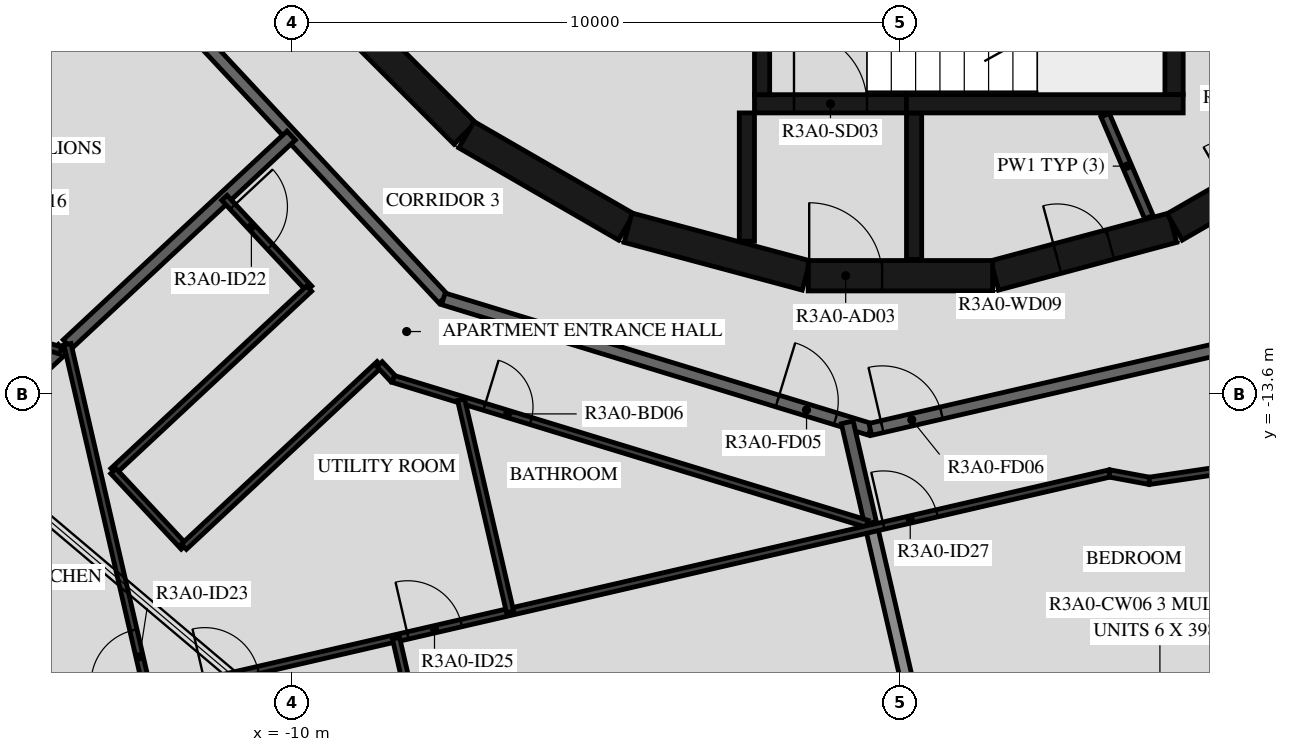
"""IFC4 building model, lengths in metres.
Left out: names, types, materials, properties, quantities, classifications, styles, units other than length and angle.
Written with IfcOpenShell. Run it as: python <this file> out.ifc"""

import sys

from ifc_helpers import new_model, si_unit, direction, frame, frame_2d, origin, place, context, subcontext, project, spatial, rectangle, extrude, element, fill, save


model = new_model("IFC4")
c1 = context("Model", 3, precision=1e-05, world=origin(), true_north=direction((0.0, 1.0)))
c2 = subcontext(c1, "Body", "Model", "MODEL_VIEW")
j1 = project(units=[si_unit("LENGTHUNIT", "METRE"), si_unit("PLANEANGLEUNIT", "RADIAN")], contexts=[c1])
p1 = place(None, origin())
s1 = spatial("IfcSite", under=j1, at=p1, CompositionType="ELEMENT")
p2 = place(p1, origin())
s2 = spatial("IfcBuilding", under=s1, at=p2, CompositionType="ELEMENT")
p3 = place(p2, frame((0.0, 0.0, 113.4)))
s3 = spatial("IfcBuildingStorey", under=s2, at=p3, CompositionType="ELEMENT", Elevation=113.4)
p4 = place(p3, frame((-26.845, -9.558, 0.03), z_axis=(0.0, 0.0, 1.0), x_axis=(0.398491196924, 0.917172157217, 0.0)))
e1 = element("IfcWall", 1, at=p4, inside=s3, PredefinedType="PARAPET", context=c2, shape_type="SweptSolid", body=[
    extrude(rectangle(XDim=35.306, YDim=0.2, at=frame_2d((17.653, 0.0))), origin(), (0.0, 0.0, 1.0), 1.5),
])
p5 = place(p3, frame((1.55, -11.643, 0.0), z_axis=(0.0, 0.0, 1.0), x_axis=(0.965948410781, 0.258734743916, 0.0)))
e2 = element("IfcWall", 2, at=p5, inside=s3, PredefinedType="SHEAR", context=c2, shape_type="SweptSolid", body=[
    extrude(rectangle(XDim=3.033, YDim=0.5, at=frame_2d((1.516, 0.0))), origin(), (0.0, 0.0, 1.0), 3.12),
])
p6 = place(p5, frame((1.066, 0.0, 0.0)))
e3 = element("IfcOpeningElement", 3, at=p6, cuts=e2, PredefinedType="OPENING", context=c2, shape_type="SweptSolid", body=[
    extrude(rectangle(XDim=0.9, YDim=2.1, at=frame_2d((0.45, 1.05))), frame((0.0, 0.26, 0.0), z_axis=(0.0, -1.0, 0.0), x_axis=(1.0, 0.0, 0.0)), (0.0, 0.0, 1.0), 0.52),
])
p7 = place(p3, frame((4.51, -10.845, 0.0), z_axis=(0.0, 0.0, 1.0), x_axis=(0.865975092491, 0.500087131594, 0.0)))
e4 = element("IfcWall", 4, at=p7, inside=s3, PredefinedType="SHEAR", context=c2, shape_type="SweptSolid", body=[
    extrude(rectangle(XDim=3.033, YDim=0.5, at=frame_2d((1.516, 0.0))), origin(), (0.0, 0.0, 1.0), 3.12),
])
p8 = place(p7, frame((1.066, 0.0, 0.0)))
e5 = element("IfcOpeningElement", 5, at=p8, cuts=e4, PredefinedType="OPENING", context=c2, shape_type="SweptSolid", body=[
    extrude(rectangle(XDim=0.9, YDim=2.1, at=frame_2d((0.45, 1.05))), frame((0.0, 0.26, 0.0), z_axis=(0.0, -1.0, 0.0), x_axis=(1.0, 0.0, 0.0)), (0.0, 0.0, 1.0), 0.52),
])
p9 = place(p3, frame((-9.308, -7.164, 0.0), z_axis=(0.0, 0.0, 1.0), x_axis=(0.707106781187, -0.707106781187, 0.0)))
e6 = element("IfcWall", 6, at=p9, inside=s3, PredefinedType="SHEAR", context=c2, shape_type="SweptSolid", body=[
    extrude(rectangle(XDim=3.032, YDim=0.5, at=frame_2d((1.516, 0.0))), origin(), (0.0, 0.0, 1.0), 3.12),
])
for number, where, z_axis, x_axis in (
    (7, (-7.137, -9.329, 0.0), (0.0, 0.0, 1.0), (0.866, -0.5, 0.0)),
    (8, (-4.479, -10.858, 0.0), (0.0, 0.0, 1.0), (0.966, -0.259, 0.0)),
):
    element("IfcWall", number, at=place(p3, frame(where, z_axis=z_axis, x_axis=x_axis)), inside=s3, PredefinedType="SHEAR", context=c2, shape_type="SweptSolid", body=[
        extrude(rectangle(XDim=3.033, YDim=0.5, at=frame_2d((1.516, 0.0))), origin(), (0.0, 0.0, 1.0), 3.12),
    ])
p10 = place(p3, frame((-1.516, -11.647, 0.0), z_axis=(0.0, 0.0, 1.0), x_axis=(1.0, 0.0, 0.0)))
e9 = element("IfcWall", 9, at=p10, inside=s3, PredefinedType="SHEAR", context=c2, shape_type="SweptSolid", body=[
    extrude(rectangle(XDim=3.033, YDim=0.5, at=frame_2d((1.516, 0.0))), origin(), (0.0, 0.0, 1.0), 3.12),
])
p11 = place(p10, frame((0.016, 0.0, 0.0)))
e10 = element("IfcOpeningElement", 10, at=p11, cuts=e9, PredefinedType="OPENING", context=c2, shape_type="SweptSolid", body=[
    extrude(rectangle(XDim=1.2, YDim=2.1, at=frame_2d((0.6, 1.05))), frame((0.0, 0.26, 0.0), z_axis=(0.0, -1.0, 0.0), x_axis=(1.0, 0.0, 0.0)), (0.0, 0.0, 1.0), 0.52),
])
p12 = place(p3, frame((-2.275, -8.67, 0.0), z_axis=(0.0, 0.0, 1.0), x_axis=(0.0, 1.0, 0.0)))
e11 = element("IfcWall", 11, at=p12, inside=s3, PredefinedType="SHEAR", context=c2, shape_type="SweptSolid", body=[
    extrude(rectangle(XDim=3.32, YDim=0.25, at=frame_2d((1.66, 0.0))), origin(), (0.0, 0.0, 1.0), 3.12),
])
p13 = place(p3, frame((4.5, -8.67, 0.0), z_axis=(0.0, 0.0, 1.0), x_axis=(0.0, 1.0, 0.0)))
e12 = element("IfcWall", 12, at=p13, inside=s3, PredefinedType="SHEAR", context=c2, shape_type="SweptSolid", body=[
    extrude(rectangle(XDim=3.32, YDim=0.3, at=frame_2d((1.66, 0.0))), origin(), (0.0, 0.0, 1.0), 3.12),
])
p14 = place(p3, frame((0.1, -8.82, 0.0), z_axis=(0.0, 0.0, 1.0), x_axis=(1.0, 0.0, 0.0)))
e13 = element("IfcWall", 13, at=p14, inside=s3, PredefinedType="SHEAR", context=c2, shape_type="SweptSolid", body=[
    extrude(rectangle(XDim=4.55, YDim=0.3, at=frame_2d((2.275, 0.0))), origin(), (0.0, 0.0, 1.0), 3.12),
])
p15 = place(p3, frame((-2.4, -8.82, 0.0), z_axis=(0.0, 0.0, 1.0), x_axis=(1.0, 0.0, 0.0)))
e14 = element("IfcWall", 14, at=p15, inside=s3, PredefinedType="SHEAR", context=c2, shape_type="SweptSolid", body=[
    extrude(rectangle(XDim=2.5, YDim=0.3, at=frame_2d((1.25, 0.0))), origin(), (0.0, 0.0, 1.0), 3.12),
])
p16 = place(p15, frame((0.65, 0.0, 0.0)))
e15 = element("IfcOpeningElement", 15, at=p16, cuts=e14, PredefinedType="OPENING", context=c2, shape_type="SweptSolid", body=[
    extrude(rectangle(XDim=1.2, YDim=2.1, at=frame_2d((0.6, 1.05))), frame((0.0, 0.16, 0.0), z_axis=(0.0, -1.0, 0.0), x_axis=(1.0, 0.0, 0.0)), (0.0, 0.0, 1.0), 0.32),
])
p17 = place(p3, frame((-2.525, -8.97, 0.0), z_axis=(0.0, 0.0, 1.0), x_axis=(0.0, -1.0, 0.0)))
e16 = element("IfcWall", 16, at=p17, inside=s3, PredefinedType="SHEAR", context=c2, shape_type="SweptSolid", body=[
    extrude(rectangle(XDim=2.11, YDim=0.25, at=frame_2d((1.055, 0.0))), origin(), (0.0, 0.0, 1.0), 3.12),
])
p18 = place(p3, frame((0.225, -8.97, 0.0), z_axis=(0.0, 0.0, 1.0), x_axis=(0.0, -1.0, 0.0)))
e17 = element("IfcWall", 17, at=p18, inside=s3, PredefinedType="SHEAR", context=c2, shape_type="SweptSolid", body=[
    extrude(rectangle(XDim=2.41, YDim=0.25, at=frame_2d((1.205, 0.0))), origin(), (0.0, 0.0, 1.0), 3.12),
])
p19 = place(p3, frame((7.842, -8.248, 0.0), z_axis=(0.0, 0.0, 1.0), x_axis=(-0.66446128181, 0.747322691329, 0.0)))
e18 = element("IfcWall", 18, at=p19, inside=s3, PredefinedType="PARTITIONING", context=c2, shape_type="SweptSolid", body=[
    extrude(rectangle(XDim=4.198, YDim=0.15, at=frame_2d((2.099, 0.0))), origin(), (0.0, 0.0, 1.0), 3.12),
])
p20 = place(p3, frame((3.367, -9.007, 0.0), z_axis=(0.0, 0.0, 1.0), x_axis=(0.394387482265, -0.918944238696, 0.0)))
e19 = element("IfcWall", 19, at=p20, inside=s3, PredefinedType="PARTITIONING", context=c2, shape_type="SweptSolid", body=[
    extrude(rectangle(XDim=1.825, YDim=0.15, at=frame_2d((0.913, 0.0))), origin(), (0.0, 0.0, 1.0), 3.12),
])
p21 = place(p3, frame((-12.523, -6.659, 0.0), z_axis=(0.0, 0.0, 1.0), x_axis=(0.682001841105, -0.731350455479, 0.0)))
e20 = element("IfcWall", 20, at=p21, inside=s3, PredefinedType="STANDARD", context=c2, shape_type="SweptSolid", body=[
    extrude(rectangle(XDim=7.342, YDim=0.2, at=frame_2d((3.671, 0.0))), origin(), (0.0, 0.0, 1.0), 3.12),
])
p22 = place(p3, frame((-7.516, -12.028, 0.0), z_axis=(0.0, 0.0, 1.0), x_axis=(0.956306642771, -0.292365533182, 0.0)))
e21 = element("IfcWall", 21, at=p22, inside=s3, PredefinedType="STANDARD", context=c2, shape_type="SweptSolid", body=[
    extrude(rectangle(XDim=7.342, YDim=0.2, at=frame_2d((3.671, 0.0))), origin(), (0.0, 0.0, 1.0), 3.12),
])
p23 = place(p22, frame((5.745, 0.0, 0.0)))
e22 = element("IfcOpeningElement", 22, at=p23, cuts=e21, PredefinedType="OPENING", context=c2, shape_type="SweptSolid", body=[
    extrude(rectangle(XDim=1.0, YDim=2.1, at=frame_2d((0.5, 1.05))), frame((0.0, 0.11, 0.0), z_axis=(0.0, -1.0, 0.0), x_axis=(1.0, 0.0, 0.0)), (0.0, 0.0, 1.0), 0.22),
])
p24 = place(p3, frame((-0.495, -14.175, 0.0), z_axis=(0.0, 0.0, 1.0), x_axis=(0.974376622151, 0.224922649383, 0.0)))
e23 = element("IfcWall", 23, at=p24, inside=s3, PredefinedType="STANDARD", context=c2, shape_type="SweptSolid", body=[
    extrude(rectangle(XDim=7.342, YDim=0.2, at=frame_2d((3.671, 0.0))), origin(), (0.0, 0.0, 1.0), 3.12),
])
p25 = place(p24, frame((0.2, 0.0, 0.0)))
e24 = element("IfcOpeningElement", 24, at=p25, cuts=e23, PredefinedType="OPENING", context=c2, shape_type="SweptSolid", body=[
    extrude(rectangle(XDim=1.0, YDim=2.1, at=frame_2d((0.5, 1.05))), frame((0.0, 0.11, 0.0), z_axis=(0.0, -1.0, 0.0), x_axis=(1.0, 0.0, 0.0)), (0.0, 0.0, 1.0), 0.22),
])
p26 = place(p3, frame((-13.699, -12.774, 0.0), z_axis=(0.0, 0.0, 1.0), x_axis=(0.731353758457, 0.681998299111, 0.0)))
e25 = element("IfcWall", 25, at=p26, inside=s3, PredefinedType="STANDARD", context=c2, shape_type="SweptSolid", body=[
    extrude(rectangle(XDim=5.031, YDim=0.2, at=frame_2d((2.515, 0.0))), origin(), (0.0, 0.0, 1.0), 3.12),
])
p27 = place(p3, frame((-14.48, -13.503, 0.0), z_axis=(0.0, 0.0, 1.0), x_axis=(0.73152991834, 0.681809341806, 0.0)))
e26 = element("IfcWall", 26, at=p27, inside=s3, PredefinedType="STANDARD", context=c2, shape_type="SweptSolid", body=[
    extrude(rectangle(XDim=0.958, YDim=0.2, at=frame_2d((0.479, 0.0))), origin(), (0.0, 0.0, 1.0), 3.12),
])
p28 = place(p3, frame((-0.492, -15.713, 0.0), z_axis=(0.0, 0.0, 1.0), x_axis=(-0.224974992875, 0.97436453783, 0.0)))
e27 = element("IfcWall", 27, at=p28, inside=s3, PredefinedType="STANDARD", context=c2, shape_type="SweptSolid", body=[
    extrude(rectangle(XDim=1.698, YDim=0.2, at=frame_2d((0.849, 0.0))), origin(), (0.0, 0.0, 1.0), 3.12),
])
p29 = place(p3, frame((0.338, -19.31, 0.0), z_axis=(0.0, 0.0, 1.0), x_axis=(-0.224943703639, 0.9743717618, 0.0)))
e28 = element("IfcWall", 28, at=p29, inside=s3, PredefinedType="STANDARD", context=c2, shape_type="SweptSolid", body=[
    extrude(rectangle(XDim=3.6, YDim=0.2, at=frame_2d((1.8, 0.0))), origin(), (0.0, 0.0, 1.0), 2.73),
])
p30 = place(p3, frame((-19.404, -11.167, 0.0), z_axis=(0.0, 0.0, 1.0), x_axis=(0.956314306829, -0.292340463423, 0.0)))
e29 = element("IfcWall", 29, at=p30, inside=s3, PredefinedType="PARTITIONING", context=c2, shape_type="SweptSolid", body=[
    extrude(rectangle(XDim=5.85, YDim=0.12, at=frame_2d((2.925, 0.0))), origin(), (0.0, 0.0, 1.0), 3.12),
])
p31 = place(p30, frame((0.3, 0.0, 0.0)))
e30 = element("IfcOpeningElement", 30, at=p31, cuts=e29, PredefinedType="OPENING", context=c2, shape_type="SweptSolid", body=[
    extrude(rectangle(XDim=0.9, YDim=2.1, at=frame_2d((0.45, 1.05))), frame((0.0, 0.07, 0.0), z_axis=(0.0, -1.0, 0.0), x_axis=(1.0, 0.0, 0.0)), (0.0, 0.0, 1.0), 0.14),
])
p32 = place(p3, frame((-11.117, -10.366, 0.0), z_axis=(0.0, 0.0, 1.0), x_axis=(0.682041233274, -0.731313719353, 0.0)))
e31 = element("IfcWall", 31, at=p32, inside=s3, PredefinedType="PARTITIONING", context=c2, shape_type="SweptSolid", body=[
    extrude(rectangle(XDim=2.042, YDim=0.12, at=frame_2d((1.021, 0.0))), origin(), (0.0, 0.0, 1.0), 3.12),
])
p33 = place(p32, frame((0.2, 0.0, 0.0)))
e32 = element("IfcOpeningElement", 32, at=p33, cuts=e31, PredefinedType="OPENING", context=c2, shape_type="SweptSolid", body=[
    extrude(rectangle(XDim=0.9, YDim=2.1, at=frame_2d((0.45, 1.05))), frame((0.0, 0.07, 0.0), z_axis=(0.0, -1.0, 0.0), x_axis=(1.0, 0.0, 0.0)), (0.0, 0.0, 1.0), 0.14),
])
p34 = place(p3, frame((-9.724, -11.859, 0.0), z_axis=(0.0, 0.0, 1.0), x_axis=(-0.731365154613, -0.681986078023, 0.0)))
e33 = element("IfcWall", 33, at=p34, inside=s3, PredefinedType="PARTITIONING", context=c2, shape_type="SweptSolid", body=[
    extrude(rectangle(XDim=4.4, YDim=0.12, at=frame_2d((2.2, 0.0))), origin(), (0.0, 0.0, 1.0), 3.12),
])
p35 = place(p3, frame((-12.943, -14.86, 0.0), z_axis=(0.0, 0.0, 1.0), x_axis=(0.682046998737, -0.731308342297, 0.0)))
e34 = element("IfcWall", 34, at=p35, inside=s3, PredefinedType="PARTITIONING", context=c2, shape_type="SweptSolid", body=[
    extrude(rectangle(XDim=1.7, YDim=0.12, at=frame_2d((0.85, 0.0))), origin(), (0.0, 0.0, 1.0), 3.12),
])
p36 = place(p3, frame((-11.783, -16.104, 0.0), z_axis=(0.0, 0.0, 1.0), x_axis=(0.731365154613, 0.681986078023, 0.0)))
e35 = element("IfcWall", 35, at=p36, inside=s3, PredefinedType="PARTITIONING", context=c2, shape_type="SweptSolid", body=[
    extrude(rectangle(XDim=4.4, YDim=0.12, at=frame_2d((2.2, 0.0))), origin(), (0.0, 0.0, 1.0), 3.12),
])
p37 = place(p3, frame((-8.565, -13.103, 0.0), z_axis=(0.0, 0.0, 1.0), x_axis=(0.681636048219, -0.731691395172, 0.0)))
e36 = element("IfcWall", 36, at=p37, inside=s3, PredefinedType="PARTITIONING", context=c2, shape_type="SweptSolid", body=[
    extrude(rectangle(XDim=0.332, YDim=0.12, at=frame_2d((0.166, 0.0))), origin(), (0.0, 0.0, 1.0), 3.12),
])
p38 = place(p3, frame((-8.339, -13.345, 0.0), z_axis=(0.0, 0.0, 1.0), x_axis=(0.956310145342, -0.292354076276, 0.0)))
e37 = element("IfcWall", 37, at=p38, inside=s3, PredefinedType="PARTITIONING", context=c2, shape_type="SweptSolid", body=[
    extrude(rectangle(XDim=8.146, YDim=0.12, at=frame_2d((4.073, 0.0))), origin(), (0.0, 0.0, 1.0), 3.12),
])
p39 = place(p38, frame((1.565, 0.0, 0.0)))
e38 = element("IfcOpeningElement", 38, at=p39, cuts=e37, PredefinedType="OPENING", context=c2, shape_type="SweptSolid", body=[
    extrude(rectangle(XDim=0.8, YDim=2.1, at=frame_2d((0.4, 1.05))), frame((0.0, 0.07, 0.0), z_axis=(0.0, -1.0, 0.0), x_axis=(1.0, 0.0, 0.0)), (0.0, 0.0, 1.0), 0.14),
])
p40 = place(p3, frame((-14.736, -19.095, 0.0), z_axis=(0.0, 0.0, 1.0), x_axis=(0.974369132722, 0.224955091516, 0.0)))
e39 = element("IfcWall", 39, at=p40, inside=s3, PredefinedType="PARTITIONING", context=c2, shape_type="SweptSolid", body=[
    extrude(rectangle(XDim=18.654, YDim=0.12, at=frame_2d((9.327, 0.0))), origin(), (0.0, 0.0, 1.0), 3.12),
])
p41 = place(p40, frame((3.383, 0.0, 0.0)))
e40 = element("IfcOpeningElement", 40, at=p41, cuts=e39, PredefinedType="OPENING", context=c2, shape_type="SweptSolid", body=[
    extrude(rectangle(XDim=0.9, YDim=2.1, at=frame_2d((0.45, 1.05))), frame((0.0, 0.07, 0.0), z_axis=(0.0, -1.0, 0.0), x_axis=(1.0, 0.0, 0.0)), (0.0, 0.0, 1.0), 0.14),
])
p42 = place(p40, frame((6.81, 0.0, 0.0)))
e41 = element("IfcOpeningElement", 41, at=p42, cuts=e39, PredefinedType="OPENING", context=c2, shape_type="SweptSolid", body=[
    extrude(rectangle(XDim=0.9, YDim=2.1, at=frame_2d((0.45, 1.05))), frame((0.0, 0.07, 0.0), z_axis=(0.0, -1.0, 0.0), x_axis=(1.0, 0.0, 0.0)), (0.0, 0.0, 1.0), 0.14),
])
p43 = place(p40, frame((0.2, 0.0, 0.0)))
e42 = element("IfcOpeningElement", 42, at=p43, cuts=e39, PredefinedType="OPENING", context=c2, shape_type="SweptSolid", body=[
    extrude(rectangle(XDim=0.9, YDim=2.1, at=frame_2d((0.45, 1.05))), frame((0.0, 0.07, 0.0), z_axis=(0.0, -1.0, 0.0), x_axis=(1.0, 0.0, 0.0)), (0.0, 0.0, 1.0), 0.14),
])
p44 = place(p40, frame((14.839, 0.0, 0.0)))
e43 = element("IfcOpeningElement", 43, at=p44, cuts=e39, PredefinedType="OPENING", context=c2, shape_type="SweptSolid", body=[
    extrude(rectangle(XDim=0.9, YDim=2.1, at=frame_2d((0.45, 1.05))), frame((0.0, 0.07, 0.0), z_axis=(0.0, -1.0, 0.0), x_axis=(1.0, 0.0, 0.0)), (0.0, 0.0, 1.0), 0.14),
])
p45 = place(p3, frame((-12.366, -18.548, 0.0), z_axis=(0.0, 0.0, 1.0), x_axis=(-0.224958805164, 0.974368275335, 0.0)))
e44 = element("IfcWall", 44, at=p45, inside=s3, PredefinedType="PARTITIONING", context=c2, shape_type="SweptSolid", body=[
    extrude(rectangle(XDim=5.926, YDim=0.12, at=frame_2d((2.963, 0.0))), origin(), (0.0, 0.0, 1.0), 3.12),
])
p46 = place(p45, frame((0.2, 0.0, 0.0)))
e45 = element("IfcOpeningElement", 45, at=p46, cuts=e44, PredefinedType="OPENING", context=c2, shape_type="SweptSolid", body=[
    extrude(rectangle(XDim=0.9, YDim=2.1, at=frame_2d((0.45, 1.05))), frame((0.0, 0.07, 0.0), z_axis=(0.0, -1.0, 0.0), x_axis=(1.0, 0.0, 0.0)), (0.0, 0.0, 1.0), 0.14),
])
p47 = place(p3, frame((-6.419, -17.175, 0.0), z_axis=(0.0, 0.0, 1.0), x_axis=(-0.224979003559, 0.974363611778, 0.0)))
e46 = element("IfcWall", 46, at=p47, inside=s3, PredefinedType="PARTITIONING", context=c2, shape_type="SweptSolid", body=[
    extrude(rectangle(XDim=3.581, YDim=0.12, at=frame_2d((1.791, 0.0))), origin(), (0.0, 0.0, 1.0), 3.12),
])
p48 = place(p3, frame((-7.486, -21.116, 0.0), z_axis=(0.0, 0.0, 1.0), x_axis=(-0.224943703639, 0.9743717618, 0.0)))
e47 = element("IfcWall", 47, at=p48, inside=s3, PredefinedType="PARTITIONING", context=c2, shape_type="SweptSolid", body=[
    extrude(rectangle(XDim=3.6, YDim=0.12, at=frame_2d((1.8, 0.0))), origin(), (0.0, 0.0, 1.0), 2.73),
])
p49 = place(p3, frame((3.44, -14.899, 0.0), z_axis=(0.0, 0.0, 1.0), x_axis=(0.98314539863, -0.182825395264, 0.0)))
e48 = element("IfcWall", 48, at=p49, inside=s3, PredefinedType="PARTITIONING", context=c2, shape_type="SweptSolid", body=[
    extrude(rectangle(XDim=0.665, YDim=0.12, at=frame_2d((0.333, 0.0))), origin(), (0.0, 0.0, 1.0), 3.12),
])
p50 = place(p3, frame((4.094, -15.021, 0.0), z_axis=(0.0, 0.0, 1.0), x_axis=(0.989259616433, 0.146169118814, 0.0)))
e49 = element("IfcWall", 49, at=p50, inside=s3, PredefinedType="PARTITIONING", context=c2, shape_type="SweptSolid", body=[
    extrude(rectangle(XDim=3.311, YDim=0.12, at=frame_2d((1.655, 0.0))), origin(), (0.0, 0.0, 1.0), 3.12),
])
p51 = place(p16, origin())
e50 = element("IfcDoor", 50, at=p51, inside=s3, OperationType="SINGLE_SWING_LEFT", PredefinedType="DOOR", context=c2, shape_type="SweptSolid", body=[
    extrude(rectangle(XDim=1.2, YDim=2.1, at=frame_2d((0.6, 1.05))), frame((0.0, 0.025, 0.0), z_axis=(0.0, -1.0, 0.0), x_axis=(1.0, 0.0, 0.0)), (0.0, 0.0, 1.0), 0.05),
])
fill(e15, e50)
p52 = place(p11, origin())
e51 = element("IfcDoor", 51, at=p52, inside=s3, OperationType="SINGLE_SWING_RIGHT", PredefinedType="DOOR", context=c2, shape_type="SweptSolid", body=[
    extrude(rectangle(XDim=1.2, YDim=2.1, at=frame_2d((0.6, 1.05))), frame((0.0, 0.025, 0.0), z_axis=(0.0, -1.0, 0.0), x_axis=(1.0, 0.0, 0.0)), (0.0, 0.0, 1.0), 0.05),
])
fill(e10, e51)
p53 = place(p6, origin())
e52 = element("IfcDoor", 52, at=p53, inside=s3, OperationType="SINGLE_SWING_RIGHT", PredefinedType="DOOR", context=c2, shape_type="SweptSolid", body=[
    extrude(rectangle(XDim=0.9, YDim=2.1, at=frame_2d((0.45, 1.05))), frame((0.0, 0.025, 0.0), z_axis=(0.0, -1.0, 0.0), x_axis=(1.0, 0.0, 0.0)), (0.0, 0.0, 1.0), 0.05),
])
fill(e3, e52)
p54 = place(p23, origin())
e53 = element("IfcDoor", 53, at=p54, inside=s3, OperationType="SINGLE_SWING_LEFT", PredefinedType="DOOR", context=c2, shape_type="SweptSolid", body=[
    extrude(rectangle(XDim=1.0, YDim=2.1, at=frame_2d((0.5, 1.05))), frame((0.0, 0.025, 0.0), z_axis=(0.0, -1.0, 0.0), x_axis=(1.0, 0.0, 0.0)), (0.0, 0.0, 1.0), 0.05),
])
fill(e22, e53)
p55 = place(p33, origin())
e54 = element("IfcDoor", 54, at=p55, inside=s3, OperationType="SINGLE_SWING_LEFT", PredefinedType="DOOR", context=c2, shape_type="SweptSolid", body=[
    extrude(rectangle(XDim=0.9, YDim=2.1, at=frame_2d((0.45, 1.05))), frame((0.0, 0.025, 0.0), z_axis=(0.0, -1.0, 0.0), x_axis=(1.0, 0.0, 0.0)), (0.0, 0.0, 1.0), 0.05),
])
fill(e32, e54)
p56 = place(p39, origin())
e55 = element("IfcDoor", 55, at=p56, inside=s3, OperationType="SINGLE_SWING_LEFT", PredefinedType="DOOR", context=c2, shape_type="SweptSolid", body=[
    extrude(rectangle(XDim=0.8, YDim=2.1, at=frame_2d((0.4, 1.05))), frame((0.0, 0.025, 0.0), z_axis=(0.0, -1.0, 0.0), x_axis=(1.0, 0.0, 0.0)), (0.0, 0.0, 1.0), 0.05),
])
fill(e38, e55)
p57 = place(p46, origin())
e56 = element("IfcDoor", 56, at=p57, inside=s3, OperationType="SINGLE_SWING_LEFT", PredefinedType="DOOR", context=c2, shape_type="SweptSolid", body=[
    extrude(rectangle(XDim=0.9, YDim=2.1, at=frame_2d((0.45, 1.05))), frame((0.0, 0.025, 0.0), z_axis=(0.0, -1.0, 0.0), x_axis=(1.0, 0.0, 0.0)), (0.0, 0.0, 1.0), 0.05),
])
fill(e45, e56)
p58 = place(p41, origin())
e57 = element("IfcDoor", 57, at=p58, inside=s3, OperationType="SINGLE_SWING_LEFT", PredefinedType="DOOR", context=c2, shape_type="SweptSolid", body=[
    extrude(rectangle(XDim=0.9, YDim=2.1, at=frame_2d((0.45, 1.05))), frame((0.0, 0.025, 0.0), z_axis=(0.0, -1.0, 0.0), x_axis=(1.0, 0.0, 0.0)), (0.0, 0.0, 1.0), 0.05),
])
fill(e40, e57)
p59 = place(p42, origin())
e58 = element("IfcDoor", 58, at=p59, inside=s3, OperationType="SINGLE_SWING_LEFT", PredefinedType="DOOR", context=c2, shape_type="SweptSolid", body=[
    extrude(rectangle(XDim=0.9, YDim=2.1, at=frame_2d((0.45, 1.05))), frame((0.0, 0.025, 0.0), z_axis=(0.0, -1.0, 0.0), x_axis=(1.0, 0.0, 0.0)), (0.0, 0.0, 1.0), 0.05),
])
fill(e41, e58)
p60 = place(p25, origin())
e59 = element("IfcDoor", 59, at=p60, inside=s3, OperationType="SINGLE_SWING_LEFT", PredefinedType="DOOR", context=c2, shape_type="SweptSolid", body=[
    extrude(rectangle(XDim=1.0, YDim=2.1, at=frame_2d((0.5, 1.05))), frame((0.0, 0.025, 0.0), z_axis=(0.0, -1.0, 0.0), x_axis=(1.0, 0.0, 0.0)), (0.0, 0.0, 1.0), 0.05),
])
fill(e24, e59)
p61 = place(p44, origin())
e60 = element("IfcDoor", 60, at=p61, inside=s3, OperationType="SINGLE_SWING_LEFT", PredefinedType="DOOR", context=c2, shape_type="SweptSolid", body=[
    extrude(rectangle(XDim=0.9, YDim=2.1, at=frame_2d((0.45, 1.05))), frame((0.0, 0.025, 0.0), z_axis=(0.0, -1.0, 0.0), x_axis=(1.0, 0.0, 0.0)), (0.0, 0.0, 1.0), 0.05),
])
fill(e43, e60)
save(model, sys.argv[1])
